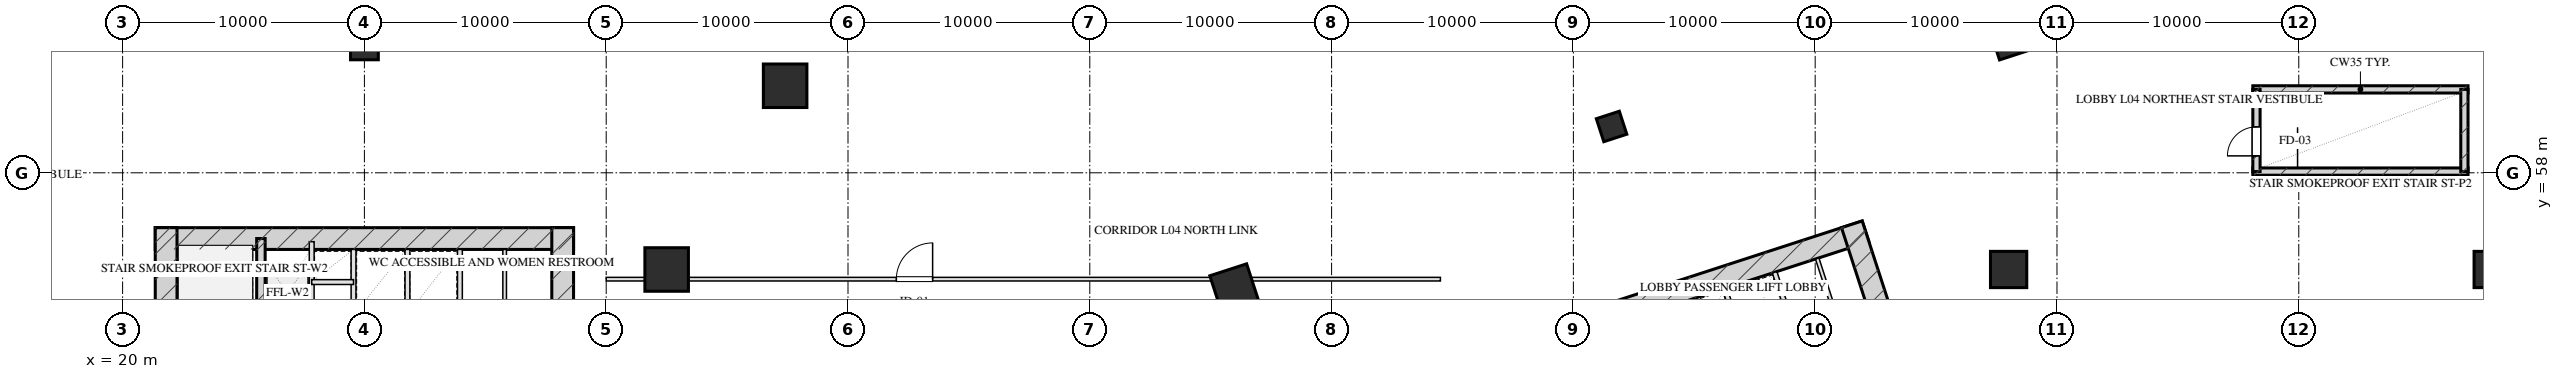
"""IFC4 building model, lengths in metres.
Left out: names, types, materials, properties, quantities, classifications, styles, units other than length and angle.
Written with IfcOpenShell. Run it as: python <this file> out.ifc"""

import sys

from ifc_helpers import new_model, si_unit, direction, frame, frame_2d, origin, origin_2d, place, context, subcontext, project, spatial, rectangle, hollow_rectangle, extrude, element, fill, save


model = new_model("IFC4")
c1 = context("Model", 3, precision=1e-05, world=origin(), true_north=direction((0.0, 1.0)))
c2 = subcontext(c1, "Body", "Model", "MODEL_VIEW")
j1 = project(units=[si_unit("LENGTHUNIT", "METRE"), si_unit("PLANEANGLEUNIT", "RADIAN")], contexts=[c1])
p1 = place(None, origin())
s1 = spatial("IfcSite", under=j1, at=p1, CompositionType="ELEMENT")
p2 = place(p1, origin())
s2 = spatial("IfcBuilding", under=s1, at=p2, CompositionType="ELEMENT")
p3 = place(p2, frame((0.0, 0.0, 22.0)))
s3 = spatial("IfcBuildingStorey", under=s2, at=p3, CompositionType="ELEMENT", Elevation=22.0)
p4 = place(p3, frame((21.35, 55.28, 0.0), z_axis=(0.0, 0.0, 1.0), x_axis=(1.0, 0.0, 0.0)))
e1 = element("IfcWall", 1, at=p4, inside=s3, PredefinedType="SHEAR", context=c2, shape_type="SweptSolid", body=[
    extrude(rectangle(XDim=17.3, YDim=0.9, at=frame_2d((8.65, 0.0))), origin(), (0.0, 0.0, 1.0), 4.0),
])
for number, where, z_axis, x_axis in (
    (2, (21.8, 45.95, 0.0), (0.0, 0.0, 1.0), (0.0, 1.0, 0.0)),
    (3, (38.2, 45.95, 0.0), (0.0, 0.0, 1.0), (0.0, 1.0, 0.0)),
):
    element("IfcWall", number, at=place(p3, frame(where, z_axis=z_axis, x_axis=x_axis)), inside=s3, PredefinedType="SHEAR", context=c2, shape_type="SweptSolid", body=[
        extrude(rectangle(XDim=9.78, YDim=0.9, at=frame_2d((4.89, 0.0))), origin(), (0.0, 0.0, 1.0), 4.0),
    ])
p5 = place(p3, frame((25.72, 48.3, 0.0), z_axis=(0.0, 0.0, 1.0), x_axis=(0.0, 1.0, 0.0)))
e4 = element("IfcWall", 4, at=p5, inside=s3, PredefinedType="SHEAR", context=c2, shape_type="SweptSolid", body=[
    extrude(rectangle(XDim=6.98, YDim=0.35, at=frame_2d((3.49, 0.0))), origin(), (0.0, 0.0, 1.0), 4.0),
])
p6 = place(p3, frame((76.201, 50.419, 0.0), z_axis=(0.0, 0.0, 1.0), x_axis=(0.951056412142, 0.309017314926, 0.0)))
e5 = element("IfcWall", 5, at=p6, inside=s3, PredefinedType="SHEAR", context=c2, shape_type="SweptSolid", body=[
    extrude(rectangle(XDim=16.7, YDim=0.9, at=frame_2d((8.35, 0.0))), origin(), (0.0, 0.0, 1.0), 4.0),
])
p7 = place(p3, frame((94.539, 46.568, 0.0), z_axis=(0.0, 0.0, 1.0), x_axis=(-0.309021722829, 0.951054979914, 0.0)))
e6 = element("IfcWall", 6, at=p7, inside=s3, PredefinedType="SHEAR", context=c2, shape_type="SweptSolid", body=[
    extrude(rectangle(XDim=9.78, YDim=0.9, at=frame_2d((4.89, 0.0))), origin(), (0.0, 0.0, 1.0), 4.0),
])
for number, where, z_axis, x_axis in (
    (7, (108.1, 58.05, 0.0), (0.0, 0.0, 1.0), (1.0, 0.0, 0.0)),
    (8, (108.1, 61.45, 0.0), (0.0, 0.0, 1.0), (1.0, 0.0, 0.0)),
):
    element("IfcWall", number, at=place(p3, frame(where, z_axis=z_axis, x_axis=x_axis)), inside=s3, PredefinedType="SHEAR", context=c2, shape_type="SweptSolid", body=[
        extrude(rectangle(XDim=8.9, YDim=0.3, at=frame_2d((4.45, 0.0))), origin(), (0.0, 0.0, 1.0), 4.0),
    ])
p8 = place(p3, frame((116.85, 58.05, 0.0), z_axis=(0.0, 0.0, 1.0), x_axis=(0.0, 1.0, 0.0)))
e9 = element("IfcWall", 9, at=p8, inside=s3, PredefinedType="SHEAR", context=c2, shape_type="SweptSolid", body=[
    extrude(rectangle(XDim=3.4, YDim=0.3, at=frame_2d((1.7, 0.0))), origin(), (0.0, 0.0, 1.0), 4.0),
])
p9 = place(p3, frame((108.25, 58.05, 0.0), z_axis=(0.0, 0.0, 1.0), x_axis=(0.0, 1.0, 0.0)))
e10 = element("IfcWall", 10, at=p9, inside=s3, PredefinedType="SHEAR", context=c2, shape_type="SweptSolid", body=[
    extrude(rectangle(XDim=3.4, YDim=0.3, at=frame_2d((1.7, 0.0))), origin(), (0.0, 0.0, 1.0), 4.0),
])
p10 = place(p9, frame((0.65, 0.0, 0.0)))
e11 = element("IfcOpeningElement", 11, at=p10, cuts=e10, PredefinedType="OPENING", context=c2, shape_type="SweptSolid", body=[
    extrude(rectangle(XDim=1.2, YDim=2.05, at=frame_2d((0.6, 1.025))), frame((0.0, 0.16, 0.0), z_axis=(0.0, -1.0, 0.0), x_axis=(1.0, 0.0, 0.0)), (0.0, 0.0, 1.0), 0.32),
])
p11 = place(p3, frame((42.5, 54.0, 0.0), z_axis=(0.0, 0.0, 1.0), x_axis=(1.0, 0.0, 0.0)))
e12 = element("IfcColumn", 12, at=p11, inside=s3, PredefinedType="COLUMN", context=c2, shape_type="SweptSolid", body=[
    extrude(hollow_rectangle(XDim=1.8, YDim=1.8, WallThickness=0.06, at=origin_2d()), origin(), (0.0, 0.0, 1.0), 4.001),
])
for number, where, z_axis, x_axis in (
    (13, (98.0, 54.0, 0.0), (0.0, 0.0, 1.0), (1.0, 0.0, 0.0)),
    (14, (118.0, 54.0, 0.0), (0.0, 0.0, 1.0), (1.0, 0.0, 0.0)),
):
    element("IfcColumn", number, at=place(p3, frame(where, z_axis=z_axis, x_axis=x_axis)), inside=s3, PredefinedType="COLUMN", context=c2, shape_type="SweptSolid", body=[
        extrude(rectangle(XDim=1.5, YDim=1.5, at=origin_2d()), origin(), (0.0, 0.0, 1.0), 4.001),
    ])
p12 = place(p3, frame((47.4, 61.6, 0.0), z_axis=(0.0, 0.0, 1.0), x_axis=(1.0, 0.0, 0.0)))
e15 = element("IfcColumn", 15, at=p12, inside=s3, PredefinedType="COLUMN", context=c2, shape_type="SweptSolid", body=[
    extrude(hollow_rectangle(XDim=1.8, YDim=1.8, WallThickness=0.06, at=origin_2d()), origin(), (0.0, 0.0, 1.0), 4.001),
])
p13 = place(p3, frame((30.0, 63.25, 0.0), z_axis=(0.0, 0.0, 1.0), x_axis=(1.0, 0.0, 0.0)))
e16 = element("IfcColumn", 16, at=p13, inside=s3, PredefinedType="COLUMN", context=c2, shape_type="SweptSolid", body=[
    extrude(hollow_rectangle(XDim=1.15, YDim=1.15, WallThickness=0.04, at=origin_2d()), origin(), (0.0, 0.0, 1.0), 4.001),
])
for number, where, z_axis, x_axis in (
    (17, (98.137, 63.677, 0.0), (0.0, 0.0, 1.0), (0.951, 0.309, 0.0)),
    (18, (65.973, 53.226, 0.0), (0.0, 0.0, 1.0), (0.951, 0.309, 0.0)),
):
    element("IfcColumn", number, at=place(p3, frame(where, z_axis=z_axis, x_axis=x_axis)), inside=s3, PredefinedType="COLUMN", context=c2, shape_type="SweptSolid", body=[
        extrude(hollow_rectangle(XDim=1.6, YDim=1.6, WallThickness=0.055, at=origin_2d()), origin(), (0.0, 0.0, 1.0), 4.001),
    ])
p14 = place(p3, frame((81.579, 59.916, 0.0), z_axis=(0.0, 0.0, 1.0), x_axis=(0.951056516295, 0.309016994375, 0.0)))
e19 = element("IfcColumn", 19, at=p14, inside=s3, PredefinedType="COLUMN", context=c2, shape_type="SweptSolid", body=[
    extrude(hollow_rectangle(XDim=1.0, YDim=1.0, WallThickness=0.036, at=origin_2d()), origin(), (0.0, 0.0, 1.0), 4.001),
])
p15 = place(p3, frame((29.55, 46.4, 0.0), z_axis=(0.0, 0.0, 1.0), x_axis=(0.0, 1.0, 0.0)))
e20 = element("IfcWall", 20, at=p15, inside=s3, PredefinedType="PARTITIONING", context=c2, shape_type="SweptSolid", body=[
    extrude(rectangle(XDim=8.43, YDim=0.2, at=frame_2d((4.215, 0.0))), origin(), (0.0, 0.0, 1.0), 3.725),
])
p16 = place(p3, frame((27.82, 51.45, 0.0), z_axis=(0.0, 0.0, 1.0), x_axis=(0.0, 1.0, 0.0)))
e21 = element("IfcWall", 21, at=p16, inside=s3, PredefinedType="PARTITIONING", context=c2, shape_type="SweptSolid", body=[
    extrude(rectangle(XDim=3.7, YDim=0.2, at=frame_2d((1.85, 0.0))), origin(), (0.0, 0.0, 1.0), 3.725),
])
p17 = place(p3, frame((27.82, 53.48, 0.0), z_axis=(0.0, 0.0, 1.0), x_axis=(1.0, 0.0, 0.0)))
e22 = element("IfcWall", 22, at=p17, inside=s3, PredefinedType="PARTITIONING", context=c2, shape_type="SweptSolid", body=[
    extrude(rectangle(XDim=1.73, YDim=0.2, at=frame_2d((0.865, 0.0))), origin(), (0.0, 0.0, 1.0), 3.725),
])
p18 = place(p3, frame((33.95, 46.4, 0.0), z_axis=(0.0, 0.0, 1.0), x_axis=(0.0, 1.0, 0.0)))
e23 = element("IfcWall", 23, at=p18, inside=s3, PredefinedType="PARTITIONING", context=c2, shape_type="SweptSolid", body=[
    extrude(rectangle(XDim=8.43, YDim=0.2, at=frame_2d((4.215, 0.0))), origin(), (0.0, 0.0, 1.0), 3.725),
])
p19 = place(p3, frame((31.78, 49.72, 0.0), z_axis=(0.0, 0.0, 1.0), x_axis=(0.0, 1.0, 0.0)))
e24 = element("IfcWall", 24, at=p19, inside=s3, PredefinedType="PARTITIONING", context=c2, shape_type="SweptSolid", body=[
    extrude(rectangle(XDim=5.11, YDim=0.2, at=frame_2d((2.555, 0.0))), origin(), (0.0, 0.0, 1.0), 3.725),
])
p20 = place(p3, frame((35.8, 49.1, 0.0), z_axis=(0.0, 0.0, 1.0), x_axis=(0.0, 1.0, 0.0)))
e25 = element("IfcWall", 25, at=p20, inside=s3, PredefinedType="PARTITIONING", context=c2, shape_type="SweptSolid", body=[
    extrude(rectangle(XDim=5.73, YDim=0.15, at=frame_2d((2.865, 0.0))), origin(), (0.0, 0.0, 1.0), 3.725),
])
p21 = place(p3, frame((90.928, 45.868, 0.0), z_axis=(0.0, 0.0, 1.0), x_axis=(-0.309042196757, 0.951048327176, 0.0)))
e26 = element("IfcWall", 26, at=p21, inside=s3, PredefinedType="PARTITIONING", context=c2, shape_type="SweptSolid", body=[
    extrude(rectangle(XDim=8.43, YDim=0.2, at=frame_2d((4.215, 0.0))), origin(), (0.0, 0.0, 1.0), 3.725),
])
p22 = place(p3, frame((87.838, 48.354, 0.0), z_axis=(0.0, 0.0, 1.0), x_axis=(-0.3090093719, 0.951058992953, 0.0)))
e27 = element("IfcWall", 27, at=p22, inside=s3, PredefinedType="PARTITIONING", context=c2, shape_type="SweptSolid", body=[
    extrude(rectangle(XDim=5.11, YDim=0.2, at=frame_2d((2.555, 0.0))), origin(), (0.0, 0.0, 1.0), 3.725),
])
p23 = place(p3, frame((91.853, 49.007, 0.0), z_axis=(0.0, 0.0, 1.0), x_axis=(-0.309022487551, 0.951054731437, 0.0)))
e28 = element("IfcWall", 28, at=p23, inside=s3, PredefinedType="PARTITIONING", context=c2, shape_type="SweptSolid", body=[
    extrude(rectangle(XDim=5.73, YDim=0.15, at=frame_2d((2.865, 0.0))), origin(), (0.0, 0.0, 1.0), 3.725),
])
p24 = place(p3, frame((40.0, 53.6, 0.0), z_axis=(0.0, 0.0, 1.0), x_axis=(1.0, 0.0, 0.0)))
e29 = element("IfcWall", 29, at=p24, inside=s3, PredefinedType="PARTITIONING", context=c2, shape_type="SweptSolid", body=[
    extrude(rectangle(XDim=34.5, YDim=0.15, at=frame_2d((17.25, 0.0))), origin(), (0.0, 0.0, 1.0), 2.315),
])
p25 = place(p24, frame((12.0, 0.0, 0.0)))
e30 = element("IfcOpeningElement", 30, at=p25, cuts=e29, PredefinedType="OPENING", context=c2, shape_type="SweptSolid", body=[
    extrude(rectangle(XDim=1.5, YDim=2.05, at=frame_2d((0.75, 1.025))), frame((0.0, 0.085, 0.0), z_axis=(0.0, -1.0, 0.0), x_axis=(1.0, 0.0, 0.0)), (0.0, 0.0, 1.0), 0.17),
])
p26 = place(p25, origin())
e31 = element("IfcDoor", 31, at=p26, inside=s3, OperationType="SINGLE_SWING_RIGHT", PredefinedType="DOOR", context=c2, shape_type="SweptSolid", body=[
    extrude(rectangle(XDim=1.5, YDim=2.05, at=frame_2d((0.75, 1.025))), frame((0.0, 0.025, 0.0), z_axis=(0.0, -1.0, 0.0), x_axis=(1.0, 0.0, 0.0)), (0.0, 0.0, 1.0), 0.05),
])
fill(e30, e31)
p27 = place(p10, origin())
e32 = element("IfcDoor", 32, at=p27, inside=s3, OperationType="SINGLE_SWING_LEFT", PredefinedType="DOOR", context=c2, shape_type="SweptSolid", body=[
    extrude(rectangle(XDim=1.2, YDim=2.05, at=frame_2d((0.6, 1.025))), frame((0.0, 0.025, 0.0), z_axis=(0.0, -1.0, 0.0), x_axis=(1.0, 0.0, 0.0)), (0.0, 0.0, 1.0), 0.05),
])
fill(e11, e32)
save(model, sys.argv[1])
